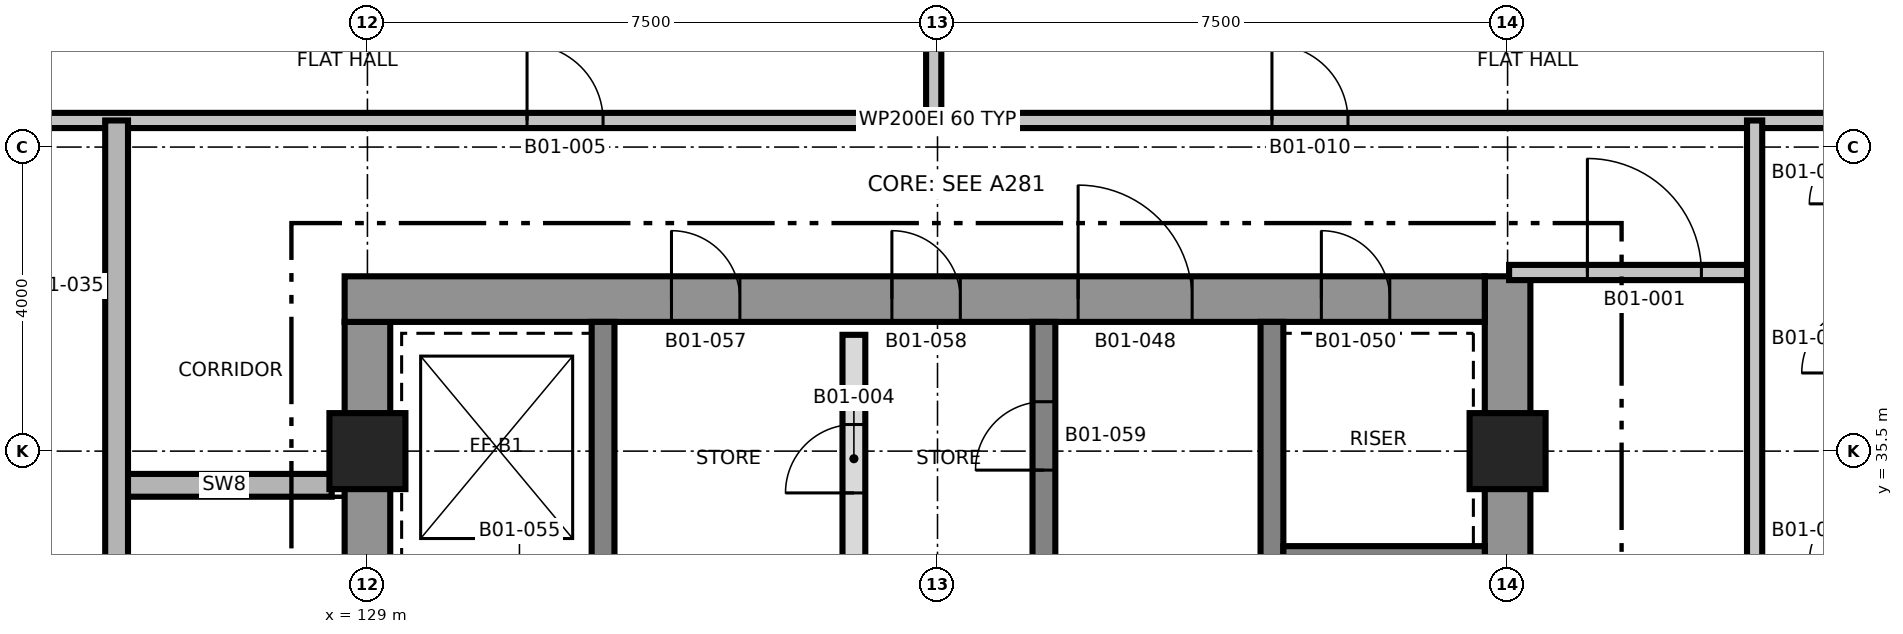
"""IFC4 building model, lengths in metres.
Left out: names, types, materials, properties, quantities, classifications, styles, units other than length and angle.
Written with IfcOpenShell. Run it as: python <this file> out.ifc"""

import sys

from ifc_helpers import new_model, si_unit, direction, frame, frame_2d, origin, origin_2d, place, context, subcontext, project, spatial, rectangle, extrude, element, fill, save


model = new_model("IFC4")
c1 = context("Model", 3, precision=1e-05, world=origin(), true_north=direction((0.0, 1.0)))
c2 = subcontext(c1, "Body", "Model", "MODEL_VIEW")
j1 = project(units=[si_unit("LENGTHUNIT", "METRE"), si_unit("PLANEANGLEUNIT", "RADIAN")], contexts=[c1])
p1 = place(None, origin())
s1 = spatial("IfcSite", under=j1, at=p1, CompositionType="ELEMENT")
p2 = place(p1, origin())
s2 = spatial("IfcBuilding", under=s1, at=p2, CompositionType="ELEMENT")
p3 = place(p2, frame((0.0, 0.0, 33.5)))
s3 = spatial("IfcBuildingStorey", under=s2, at=p3, CompositionType="ELEMENT", Elevation=33.5)
p4 = place(p3, frame((129.0, 24.8, 0.0), z_axis=(0.0, 0.0, 1.0), x_axis=(0.0, 1.0, 0.0)))
e1 = element("IfcWall", 1, at=p4, inside=s3, PredefinedType="SHEAR", context=c2, shape_type="SweptSolid", body=[
    extrude(rectangle(XDim=12.4, YDim=0.6, at=frame_2d((6.2, 0.0))), origin(), (0.0, 0.0, 1.0), 3.7),
])
p5 = place(p4, frame((5.15, 0.0, 0.0)))
e2 = element("IfcOpeningElement", 2, at=p5, cuts=e1, PredefinedType="OPENING", context=c2, shape_type="SweptSolid", body=[
    extrude(rectangle(XDim=1.0, YDim=2.1, at=frame_2d((0.5, 1.05))), frame((0.0, 0.31, 0.0), z_axis=(0.0, -1.0, 0.0), x_axis=(1.0, 0.0, 0.0)), (0.0, 0.0, 1.0), 0.62),
])
p6 = place(p3, frame((144.0, 24.2, 0.0), z_axis=(0.0, 0.0, 1.0), x_axis=(0.0, 1.0, 0.0)))
e3 = element("IfcWall", 3, at=p6, inside=s3, PredefinedType="SHEAR", context=c2, shape_type="SweptSolid", body=[
    extrude(rectangle(XDim=13.6, YDim=0.6, at=frame_2d((6.8, 0.0))), origin(), (0.0, 0.0, 1.0), 3.7),
])
p7 = place(p3, frame((128.7, 37.5, 0.0), z_axis=(0.0, 0.0, 1.0), x_axis=(1.0, 0.0, 0.0)))
e4 = element("IfcWall", 4, at=p7, inside=s3, PredefinedType="SHEAR", context=c2, shape_type="SweptSolid", body=[
    extrude(rectangle(XDim=15.0, YDim=0.6, at=frame_2d((7.5, 0.0))), origin(), (0.0, 0.0, 1.0), 3.7),
])
p8 = place(p7, frame((9.65, 0.0, 0.0)))
e5 = element("IfcOpeningElement", 5, at=p8, cuts=e4, PredefinedType="OPENING", context=c2, shape_type="SweptSolid", body=[
    extrude(rectangle(XDim=1.5, YDim=2.1, at=frame_2d((0.75, 1.05))), frame((0.0, 0.31, 0.0), z_axis=(0.0, -1.0, 0.0), x_axis=(1.0, 0.0, 0.0)), (0.0, 0.0, 1.0), 0.62),
])
p9 = place(p7, frame((12.85, 0.0, 0.0)))
e6 = element("IfcOpeningElement", 6, at=p9, cuts=e4, PredefinedType="OPENING", context=c2, shape_type="SweptSolid", body=[
    extrude(rectangle(XDim=0.9, YDim=2.1, at=frame_2d((0.45, 1.05))), frame((0.0, 0.31, 0.0), z_axis=(0.0, -1.0, 0.0), x_axis=(1.0, 0.0, 0.0)), (0.0, 0.0, 1.0), 0.62),
])
p10 = place(p7, frame((4.3, 0.0, 0.0)))
e7 = element("IfcOpeningElement", 7, at=p10, cuts=e4, PredefinedType="OPENING", context=c2, shape_type="SweptSolid", body=[
    extrude(rectangle(XDim=0.9, YDim=2.1, at=frame_2d((0.45, 1.05))), frame((0.0, 0.31, 0.0), z_axis=(0.0, -1.0, 0.0), x_axis=(1.0, 0.0, 0.0)), (0.0, 0.0, 1.0), 0.62),
])
p11 = place(p7, frame((7.2, 0.0, 0.0)))
e8 = element("IfcOpeningElement", 8, at=p11, cuts=e4, PredefinedType="OPENING", context=c2, shape_type="SweptSolid", body=[
    extrude(rectangle(XDim=0.9, YDim=2.1, at=frame_2d((0.45, 1.05))), frame((0.0, 0.31, 0.0), z_axis=(0.0, -1.0, 0.0), x_axis=(1.0, 0.0, 0.0)), (0.0, 0.0, 1.0), 0.62),
])
p12 = place(p3, frame((132.1, 24.8, 0.0), z_axis=(0.0, 0.0, 1.0), x_axis=(0.0, 1.0, 0.0)))
e9 = element("IfcWall", 9, at=p12, inside=s3, PredefinedType="SHEAR", context=c2, shape_type="SweptSolid", body=[
    extrude(rectangle(XDim=12.4, YDim=0.3, at=frame_2d((6.2, 0.0))), origin(), (0.0, 0.0, 1.0), 3.7),
])
p13 = place(p12, frame((3.9, 0.0, 0.0)))
e10 = element("IfcOpeningElement", 10, at=p13, cuts=e9, PredefinedType="OPENING", context=c2, shape_type="SweptSolid", body=[
    extrude(rectangle(XDim=1.2, YDim=2.1, at=frame_2d((0.6, 1.05))), frame((0.0, 0.16, 0.0), z_axis=(0.0, -1.0, 0.0), x_axis=(1.0, 0.0, 0.0)), (0.0, 0.0, 1.0), 0.32),
])
p14 = place(p3, frame((137.9, 24.8, 0.0), z_axis=(0.0, 0.0, 1.0), x_axis=(0.0, 1.0, 0.0)))
e11 = element("IfcWall", 11, at=p14, inside=s3, PredefinedType="SHEAR", context=c2, shape_type="SweptSolid", body=[
    extrude(rectangle(XDim=12.4, YDim=0.3, at=frame_2d((6.2, 0.0))), origin(), (0.0, 0.0, 1.0), 3.7),
])
p15 = place(p14, frame((3.95, 0.0, 0.0)))
e12 = element("IfcOpeningElement", 12, at=p15, cuts=e11, PredefinedType="OPENING", context=c2, shape_type="SweptSolid", body=[
    extrude(rectangle(XDim=1.5, YDim=2.1, at=frame_2d((0.75, 1.05))), frame((0.0, 0.16, 0.0), z_axis=(0.0, -1.0, 0.0), x_axis=(1.0, 0.0, 0.0)), (0.0, 0.0, 1.0), 0.32),
])
p16 = place(p14, frame((10.45, 0.0, 0.0)))
e13 = element("IfcOpeningElement", 13, at=p16, cuts=e11, PredefinedType="OPENING", context=c2, shape_type="SweptSolid", body=[
    extrude(rectangle(XDim=0.9, YDim=2.1, at=frame_2d((0.45, 1.05))), frame((0.0, 0.16, 0.0), z_axis=(0.0, -1.0, 0.0), x_axis=(1.0, 0.0, 0.0)), (0.0, 0.0, 1.0), 0.32),
])
p17 = place(p3, frame((140.9, 24.8, 0.0), z_axis=(0.0, 0.0, 1.0), x_axis=(0.0, 1.0, 0.0)))
e14 = element("IfcWall", 14, at=p17, inside=s3, PredefinedType="SHEAR", context=c2, shape_type="SweptSolid", body=[
    extrude(rectangle(XDim=12.4, YDim=0.3, at=frame_2d((6.2, 0.0))), origin(), (0.0, 0.0, 1.0), 3.7),
])
p18 = place(p17, frame((5.9, 0.0, 0.0)))
e15 = element("IfcOpeningElement", 15, at=p18, cuts=e14, PredefinedType="OPENING", context=c2, shape_type="SweptSolid", body=[
    extrude(rectangle(XDim=1.2, YDim=2.1, at=frame_2d((0.6, 1.05))), frame((0.0, 0.16, 0.0), z_axis=(0.0, -1.0, 0.0), x_axis=(1.0, 0.0, 0.0)), (0.0, 0.0, 1.0), 0.32),
])
p19 = place(p3, frame((141.05, 34.1, 0.0), z_axis=(0.0, 0.0, 1.0), x_axis=(1.0, 0.0, 0.0)))
e16 = element("IfcWall", 16, at=p19, inside=s3, PredefinedType="SHEAR", context=c2, shape_type="SweptSolid", body=[
    extrude(rectangle(XDim=2.65, YDim=0.3, at=frame_2d((1.325, 0.0))), origin(), (0.0, 0.0, 1.0), 3.7),
])
for number, where, z_axis, x_axis in (
    (17, (129.0, 35.5, 0.0), (0.0, 0.0, 1.0), (1.0, 0.0, 0.0)),
    (18, (144.0, 35.5, 0.0), (0.0, 0.0, 1.0), (1.0, 0.0, 0.0)),
):
    element("IfcColumn", number, at=place(p3, frame(where, z_axis=z_axis, x_axis=x_axis)), inside=s3, PredefinedType="COLUMN", context=c2, shape_type="SweptSolid", body=[
        extrude(rectangle(XDim=1.0, YDim=1.0, at=origin_2d()), origin(), (0.0, 0.0, 1.0), 3.7),
    ])
p20 = place(p3, frame((125.7, 35.05, 0.0), z_axis=(0.0, 0.0, 1.0), x_axis=(1.0, 0.0, 0.0)))
e19 = element("IfcWall", 19, at=p20, inside=s3, PredefinedType="SHEAR", context=c2, shape_type="SweptSolid", body=[
    extrude(rectangle(XDim=2.83, YDim=0.3, at=frame_2d((1.415, 0.0))), origin(), (0.0, 0.0, 1.0), 3.4),
])
p21 = place(p3, frame((144.02, 37.85, 0.0), z_axis=(0.0, 0.0, 1.0), x_axis=(1.0, 0.0, 0.0)))
e20 = element("IfcWall", 20, at=p21, inside=s3, PredefinedType="PARTITIONING", context=c2, shape_type="SweptSolid", body=[
    extrude(rectangle(XDim=3.23, YDim=0.2, at=frame_2d((1.615, 0.0))), origin(), (0.0, 0.0, 1.0), 3.4),
])
p22 = place(p21, frame((1.03, 0.0, 0.0)))
e21 = element("IfcOpeningElement", 21, at=p22, cuts=e20, PredefinedType="OPENING", context=c2, shape_type="SweptSolid", body=[
    extrude(rectangle(XDim=1.5, YDim=2.1, at=frame_2d((0.75, 1.05))), frame((0.0, 0.11, 0.0), z_axis=(0.0, -1.0, 0.0), x_axis=(1.0, 0.0, 0.0)), (0.0, 0.0, 1.0), 0.22),
])
p23 = place(p3, frame((120.89, 39.85, 0.0), z_axis=(0.0, 0.0, 1.0), x_axis=(1.0, 0.0, 0.0)))
e22 = element("IfcWall", 22, at=p23, inside=s3, PredefinedType="PARTITIONING", context=c2, shape_type="SweptSolid", body=[
    extrude(rectangle(XDim=31.22, YDim=0.2, at=frame_2d((15.61, 0.0))), origin(), (0.0, 0.0, 1.0), 3.4),
])
p24 = place(p23, frame((10.21, 0.0, 0.0)))
e23 = element("IfcOpeningElement", 23, at=p24, cuts=e22, PredefinedType="OPENING", context=c2, shape_type="SweptSolid", body=[
    extrude(rectangle(XDim=1.0, YDim=2.1, at=frame_2d((0.5, 1.05))), frame((0.0, 0.11, 0.0), z_axis=(0.0, -1.0, 0.0), x_axis=(1.0, 0.0, 0.0)), (0.0, 0.0, 1.0), 0.22),
])
p25 = place(p23, frame((20.01, 0.0, 0.0)))
e24 = element("IfcOpeningElement", 24, at=p25, cuts=e22, PredefinedType="OPENING", context=c2, shape_type="SweptSolid", body=[
    extrude(rectangle(XDim=1.0, YDim=2.1, at=frame_2d((0.5, 1.05))), frame((0.0, 0.11, 0.0), z_axis=(0.0, -1.0, 0.0), x_axis=(1.0, 0.0, 0.0)), (0.0, 0.0, 1.0), 0.22),
])
p26 = place(p3, frame((125.7, 22.15, 0.0), z_axis=(0.0, 0.0, 1.0), x_axis=(0.0, 1.0, 0.0)))
e25 = element("IfcWall", 25, at=p26, inside=s3, PredefinedType="SHEAR", context=c2, shape_type="SweptSolid", body=[
    extrude(rectangle(XDim=17.7, YDim=0.3, at=frame_2d((8.85, 0.0))), origin(), (0.0, 0.0, 1.0), 3.4),
])
p27 = place(p26, frame((2.7, 0.0, 0.0)))
e26 = element("IfcOpeningElement", 26, at=p27, cuts=e25, PredefinedType="OPENING", context=c2, shape_type="SweptSolid", body=[
    extrude(rectangle(XDim=1.0, YDim=2.1, at=frame_2d((0.5, 1.05))), frame((0.0, 0.16, 0.0), z_axis=(0.0, -1.0, 0.0), x_axis=(1.0, 0.0, 0.0)), (0.0, 0.0, 1.0), 0.32),
])
p28 = place(p3, frame((135.4, 33.77, 0.0), z_axis=(0.0, 0.0, 1.0), x_axis=(0.0, 1.0, 0.0)))
e27 = element("IfcWall", 27, at=p28, inside=s3, PredefinedType="PARTITIONING", context=c2, shape_type="SweptSolid", body=[
    extrude(rectangle(XDim=3.26, YDim=0.3, at=frame_2d((1.63, 0.0))), origin(), (0.0, 0.0, 1.0), 3.4),
])
p29 = place(p28, frame((1.18, 0.0, 0.0)))
e28 = element("IfcOpeningElement", 28, at=p29, cuts=e27, PredefinedType="OPENING", context=c2, shape_type="SweptSolid", body=[
    extrude(rectangle(XDim=0.9, YDim=2.1, at=frame_2d((0.45, 1.05))), frame((0.0, 0.16, 0.0), z_axis=(0.0, -1.0, 0.0), x_axis=(1.0, 0.0, 0.0)), (0.0, 0.0, 1.0), 0.32),
])
p30 = place(p3, frame((136.45, 39.85, 0.0), z_axis=(0.0, 0.0, 1.0), x_axis=(0.0, 1.0, 0.0)))
e29 = element("IfcWall", 29, at=p30, inside=s3, PredefinedType="PARTITIONING", context=c2, shape_type="SweptSolid", body=[
    extrude(rectangle(XDim=5.26, YDim=0.2, at=frame_2d((2.63, 0.0))), origin(), (0.0, 0.0, 1.0), 3.4),
])
p31 = place(p3, frame((147.25, 22.15, 0.0), z_axis=(0.0, 0.0, 1.0), x_axis=(0.0, 1.0, 0.0)))
e30 = element("IfcWall", 30, at=p31, inside=s3, PredefinedType="PARTITIONING", context=c2, shape_type="SweptSolid", body=[
    extrude(rectangle(XDim=17.7, YDim=0.2, at=frame_2d((8.85, 0.0))), origin(), (0.0, 0.0, 1.0), 3.4),
])
p32 = place(p31, frame((2.65, 0.0, 0.0)))
e31 = element("IfcOpeningElement", 31, at=p32, cuts=e30, PredefinedType="OPENING", context=c2, shape_type="SweptSolid", body=[
    extrude(rectangle(XDim=1.0, YDim=2.1, at=frame_2d((0.5, 1.05))), frame((0.0, 0.11, 0.0), z_axis=(0.0, -1.0, 0.0), x_axis=(1.0, 0.0, 0.0)), (0.0, 0.0, 1.0), 0.22),
])
p33 = place(p22, origin())
e32 = element("IfcDoor", 32, at=p33, inside=s3, OperationType="SINGLE_SWING_LEFT", PredefinedType="DOOR", context=c2, shape_type="SweptSolid", body=[
    extrude(rectangle(XDim=1.5, YDim=2.1, at=frame_2d((0.75, 1.05))), frame((0.0, 0.025, 0.0), z_axis=(0.0, -1.0, 0.0), x_axis=(1.0, 0.0, 0.0)), (0.0, 0.0, 1.0), 0.05),
])
fill(e21, e32)
p34 = place(p29, origin())
e33 = element("IfcDoor", 33, at=p34, inside=s3, OperationType="SINGLE_SWING_RIGHT", PredefinedType="DOOR", context=c2, shape_type="SweptSolid", body=[
    extrude(rectangle(XDim=0.9, YDim=2.1, at=frame_2d((0.45, 1.05))), frame((0.0, 0.025, 0.0), z_axis=(0.0, -1.0, 0.0), x_axis=(1.0, 0.0, 0.0)), (0.0, 0.0, 1.0), 0.05),
])
fill(e28, e33)
p35 = place(p24, origin())
e34 = element("IfcDoor", 34, at=p35, inside=s3, OperationType="SINGLE_SWING_LEFT", PredefinedType="DOOR", context=c2, shape_type="SweptSolid", body=[
    extrude(rectangle(XDim=1.0, YDim=2.1, at=frame_2d((0.5, 1.05))), frame((0.0, 0.025, 0.0), z_axis=(0.0, -1.0, 0.0), x_axis=(1.0, 0.0, 0.0)), (0.0, 0.0, 1.0), 0.05),
])
fill(e23, e34)
p36 = place(p25, origin())
e35 = element("IfcDoor", 35, at=p36, inside=s3, OperationType="SINGLE_SWING_RIGHT", PredefinedType="DOOR", context=c2, shape_type="SweptSolid", body=[
    extrude(rectangle(XDim=1.0, YDim=2.1, at=frame_2d((0.5, 1.05))), frame((0.0, 0.025, 0.0), z_axis=(0.0, -1.0, 0.0), x_axis=(1.0, 0.0, 0.0)), (0.0, 0.0, 1.0), 0.05),
])
fill(e24, e35)
p37 = place(p8, origin())
e36 = element("IfcDoor", 36, at=p37, inside=s3, OperationType="SINGLE_SWING_RIGHT", PredefinedType="DOOR", context=c2, shape_type="SweptSolid", body=[
    extrude(rectangle(XDim=1.5, YDim=2.1, at=frame_2d((0.75, 1.05))), frame((0.0, 0.025, 0.0), z_axis=(0.0, -1.0, 0.0), x_axis=(1.0, 0.0, 0.0)), (0.0, 0.0, 1.0), 0.05),
])
fill(e5, e36)
p38 = place(p9, origin())
e37 = element("IfcDoor", 37, at=p38, inside=s3, OperationType="SINGLE_SWING_RIGHT", PredefinedType="DOOR", context=c2, shape_type="SweptSolid", body=[
    extrude(rectangle(XDim=0.9, YDim=2.1, at=frame_2d((0.45, 1.05))), frame((0.0, 0.025, 0.0), z_axis=(0.0, -1.0, 0.0), x_axis=(1.0, 0.0, 0.0)), (0.0, 0.0, 1.0), 0.05),
])
fill(e6, e37)
p39 = place(p10, origin())
e38 = element("IfcDoor", 38, at=p39, inside=s3, OperationType="SINGLE_SWING_LEFT", PredefinedType="DOOR", context=c2, shape_type="SweptSolid", body=[
    extrude(rectangle(XDim=0.9, YDim=2.1, at=frame_2d((0.45, 1.05))), frame((0.0, 0.025, 0.0), z_axis=(0.0, -1.0, 0.0), x_axis=(1.0, 0.0, 0.0)), (0.0, 0.0, 1.0), 0.05),
])
fill(e7, e38)
p40 = place(p11, origin())
e39 = element("IfcDoor", 39, at=p40, inside=s3, OperationType="SINGLE_SWING_RIGHT", PredefinedType="DOOR", context=c2, shape_type="SweptSolid", body=[
    extrude(rectangle(XDim=0.9, YDim=2.1, at=frame_2d((0.45, 1.05))), frame((0.0, 0.025, 0.0), z_axis=(0.0, -1.0, 0.0), x_axis=(1.0, 0.0, 0.0)), (0.0, 0.0, 1.0), 0.05),
])
fill(e8, e39)
p41 = place(p16, origin())
e40 = element("IfcDoor", 40, at=p41, inside=s3, OperationType="SINGLE_SWING_RIGHT", PredefinedType="DOOR", context=c2, shape_type="SweptSolid", body=[
    extrude(rectangle(XDim=0.9, YDim=2.1, at=frame_2d((0.45, 1.05))), frame((0.0, 0.025, 0.0), z_axis=(0.0, -1.0, 0.0), x_axis=(1.0, 0.0, 0.0)), (0.0, 0.0, 1.0), 0.05),
])
fill(e13, e40)
save(model, sys.argv[1])
